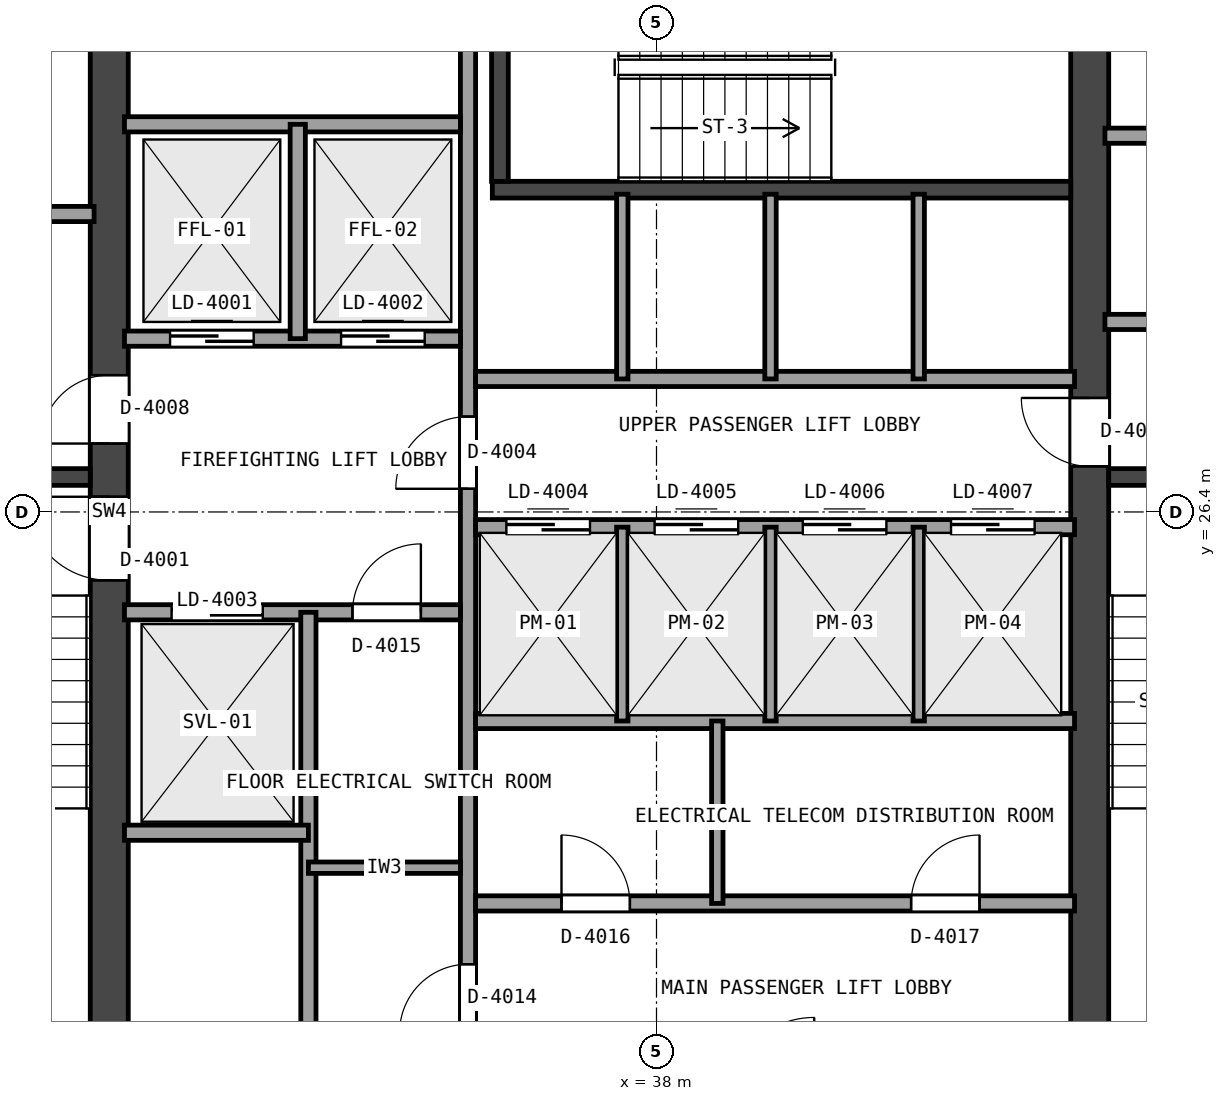
"""IFC4 building model, lengths in metres.
Left out: names, types, materials, properties, quantities, classifications, styles, units other than length and angle.
Written with IfcOpenShell. Run it as: python <this file> out.ifc"""

import sys

from ifc_helpers import new_model, si_unit, direction, frame, frame_2d, origin, place, context, subcontext, project, spatial, rectangle, extrude, element, fill, save


model = new_model("IFC4")
c1 = context("Model", 3, precision=1e-05, world=origin(), true_north=direction((0.0, 1.0)))
c2 = subcontext(c1, "Body", "Model", "MODEL_VIEW")
j1 = project(units=[si_unit("LENGTHUNIT", "METRE"), si_unit("PLANEANGLEUNIT", "RADIAN")], contexts=[c1])
p1 = place(None, origin())
s1 = spatial("IfcSite", under=j1, at=p1, CompositionType="ELEMENT")
p2 = place(p1, origin())
s2 = spatial("IfcBuilding", under=s1, at=p2, CompositionType="ELEMENT")
p3 = place(p2, frame((0.0, 0.0, 172.5)))
s3 = spatial("IfcBuildingStorey", under=s2, at=p3, CompositionType="ELEMENT", Elevation=172.5)
p4 = place(p3, frame((30.8, 18.9, 0.0), z_axis=(0.0, 0.0, 1.0), x_axis=(0.0, 1.0, 0.0)))
e1 = element("IfcWall", 1, at=p4, inside=s3, PredefinedType="SHEAR", context=c2, shape_type="SweptSolid", body=[
    extrude(rectangle(XDim=15.0, YDim=0.5, at=frame_2d((7.5, 0.0))), origin(), (0.0, 0.0, 1.0), 4.08),
])
p5 = place(p4, frame((6.6, 0.0, 0.0)))
e2 = element("IfcOpeningElement", 2, at=p5, cuts=e1, PredefinedType="OPENING", context=c2, shape_type="SweptSolid", body=[
    extrude(rectangle(XDim=1.1, YDim=2.15, at=frame_2d((0.55, 1.075))), frame((0.0, 0.26, 0.0), z_axis=(0.0, -1.0, 0.0), x_axis=(1.0, 0.0, 0.0)), (0.0, 0.0, 1.0), 0.52),
])
p6 = place(p4, frame((8.4, 0.0, 0.0)))
e3 = element("IfcOpeningElement", 3, at=p6, cuts=e1, PredefinedType="OPENING", context=c2, shape_type="SweptSolid", body=[
    extrude(rectangle(XDim=0.9, YDim=2.1, at=frame_2d((0.45, 1.05))), frame((0.0, 0.26, 0.0), z_axis=(0.0, -1.0, 0.0), x_axis=(1.0, 0.0, 0.0)), (0.0, 0.0, 1.0), 0.52),
])
p7 = place(p3, frame((43.7, 18.9, 0.0), z_axis=(0.0, 0.0, 1.0), x_axis=(0.0, 1.0, 0.0)))
e4 = element("IfcWall", 4, at=p7, inside=s3, PredefinedType="SHEAR", context=c2, shape_type="SweptSolid", body=[
    extrude(rectangle(XDim=15.0, YDim=0.5, at=frame_2d((7.5, 0.0))), origin(), (0.0, 0.0, 1.0), 4.08),
])
p8 = place(p7, frame((8.1, 0.0, 0.0)))
e5 = element("IfcOpeningElement", 5, at=p8, cuts=e4, PredefinedType="OPENING", context=c2, shape_type="SweptSolid", body=[
    extrude(rectangle(XDim=0.9, YDim=2.1, at=frame_2d((0.45, 1.05))), frame((0.0, 0.26, 0.0), z_axis=(0.0, -1.0, 0.0), x_axis=(1.0, 0.0, 0.0)), (0.0, 0.0, 1.0), 0.52),
])
p9 = place(p3, frame((27.1, 26.86, 0.0), z_axis=(0.0, 0.0, 1.0), x_axis=(1.0, 0.0, 0.0)))
e6 = element("IfcWall", 6, at=p9, inside=s3, PredefinedType="SHEAR", context=c2, shape_type="SweptSolid", body=[
    extrude(rectangle(XDim=3.45, YDim=0.22, at=frame_2d((1.725, 0.0))), origin(), (0.0, 0.0, 1.0), 4.08),
])
p10 = place(p3, frame((43.95, 26.86, 0.0), z_axis=(0.0, 0.0, 1.0), x_axis=(1.0, 0.0, 0.0)))
e7 = element("IfcWall", 7, at=p10, inside=s3, PredefinedType="SHEAR", context=c2, shape_type="SweptSolid", body=[
    extrude(rectangle(XDim=3.35, YDim=0.22, at=frame_2d((1.675, 0.0))), origin(), (0.0, 0.0, 1.0), 4.08),
])
p11 = place(p3, frame((35.84, 30.64, 0.0), z_axis=(0.0, 0.0, 1.0), x_axis=(1.0, 0.0, 0.0)))
e8 = element("IfcWall", 8, at=p11, inside=s3, PredefinedType="SHEAR", context=c2, shape_type="SweptSolid", body=[
    extrude(rectangle(XDim=7.61, YDim=0.22, at=frame_2d((3.805, 0.0))), origin(), (0.0, 0.0, 1.0), 4.08),
])
p12 = place(p3, frame((35.94, 30.75, 0.0), z_axis=(0.0, 0.0, 1.0), x_axis=(0.0, 1.0, 0.0)))
e9 = element("IfcWall", 9, at=p12, inside=s3, PredefinedType="SHEAR", context=c2, shape_type="SweptSolid", body=[
    extrude(rectangle(XDim=3.15, YDim=0.22, at=frame_2d((1.575, 0.0))), origin(), (0.0, 0.0, 1.0), 4.08),
])
p13 = place(p3, frame((27.15, 30.32, 0.0), z_axis=(0.0, 0.0, 1.0), x_axis=(1.0, 0.0, 0.0)))
e10 = element("IfcWall", 10, at=p13, inside=s3, PredefinedType="SOLIDWALL", context=c2, shape_type="SweptSolid", body=[
    extrude(rectangle(XDim=3.45, YDim=0.2, at=frame_2d((1.725, 0.0))), origin(), (0.0, 0.0, 1.0), 4.08),
])
p14 = place(p3, frame((43.9, 28.9, 0.0), z_axis=(0.0, 0.0, 1.0), x_axis=(1.0, 0.0, 0.0)))
e11 = element("IfcWall", 11, at=p14, inside=s3, PredefinedType="SOLIDWALL", context=c2, shape_type="SweptSolid", body=[
    extrude(rectangle(XDim=3.35, YDim=0.2, at=frame_2d((1.675, 0.0))), origin(), (0.0, 0.0, 1.0), 4.08),
])
p15 = place(p14, frame((1.15, 0.0, 0.0)))
e12 = element("IfcOpeningElement", 12, at=p15, cuts=e11, PredefinedType="OPENING", context=c2, shape_type="SweptSolid", body=[
    extrude(rectangle(XDim=0.9, YDim=2.1, at=frame_2d((0.45, 1.05))), frame((0.0, 0.11, 0.0), z_axis=(0.0, -1.0, 0.0), x_axis=(1.0, 0.0, 0.0)), (0.0, 0.0, 1.0), 0.22),
])
p16 = place(p3, frame((43.9, 31.35, 0.0), z_axis=(0.0, 0.0, 1.0), x_axis=(1.0, 0.0, 0.0)))
e13 = element("IfcWall", 13, at=p16, inside=s3, PredefinedType="SOLIDWALL", context=c2, shape_type="SweptSolid", body=[
    extrude(rectangle(XDim=3.35, YDim=0.2, at=frame_2d((1.675, 0.0))), origin(), (0.0, 0.0, 1.0), 4.08),
])
p17 = place(p3, frame((35.52, 18.95, 0.0), z_axis=(0.0, 0.0, 1.0), x_axis=(0.0, 1.0, 0.0)))
e14 = element("IfcWall", 14, at=p17, inside=s3, PredefinedType="SOLIDWALL", context=c2, shape_type="SweptSolid", body=[
    extrude(rectangle(XDim=14.9, YDim=0.2, at=frame_2d((7.45, 0.0))), origin(), (0.0, 0.0, 1.0), 3.601),
])
p18 = place(p17, frame((7.755, 0.0, 0.0)))
e15 = element("IfcOpeningElement", 15, at=p18, cuts=e14, PredefinedType="OPENING", context=c2, shape_type="SweptSolid", body=[
    extrude(rectangle(XDim=0.95, YDim=2.15, at=frame_2d((0.475, 1.075))), frame((0.0, 0.11, 0.0), z_axis=(0.0, -1.0, 0.0), x_axis=(1.0, 0.0, 0.0)), (0.0, 0.0, 1.0), 0.22),
])
p19 = place(p17, frame((0.6, 0.0, 0.0)))
e16 = element("IfcOpeningElement", 16, at=p19, cuts=e14, PredefinedType="OPENING", context=c2, shape_type="SweptSolid", body=[
    extrude(rectangle(XDim=0.9, YDim=2.1, at=frame_2d((0.45, 1.05))), frame((0.0, 0.11, 0.0), z_axis=(0.0, -1.0, 0.0), x_axis=(1.0, 0.0, 0.0)), (0.0, 0.0, 1.0), 0.22),
])
p20 = place(p3, frame((31.0, 28.68, 0.0), z_axis=(0.0, 0.0, 1.0), x_axis=(1.0, 0.0, 0.0)))
e17 = element("IfcWall", 17, at=p20, inside=s3, PredefinedType="SOLIDWALL", context=c2, shape_type="SweptSolid", body=[
    extrude(rectangle(XDim=4.42, YDim=0.2, at=frame_2d((2.21, 0.0))), origin(), (0.0, 0.0, 1.0), 4.08),
])
p21 = place(p20, frame((0.6, 0.0, 0.0)))
e18 = element("IfcOpeningElement", 18, at=p21, cuts=e17, PredefinedType="OPENING", context=c2, shape_type="SweptSolid", body=[
    extrude(rectangle(XDim=1.1, YDim=2.15, at=frame_2d((0.55, 1.075))), frame((0.0, 0.11, 0.0), z_axis=(0.0, -1.0, 0.0), x_axis=(1.0, 0.0, 0.0)), (0.0, 0.0, 1.0), 0.22),
])
p22 = place(p20, frame((2.85, 0.0, 0.0)))
e19 = element("IfcOpeningElement", 19, at=p22, cuts=e17, PredefinedType="OPENING", context=c2, shape_type="SweptSolid", body=[
    extrude(rectangle(XDim=1.1, YDim=2.15, at=frame_2d((0.55, 1.075))), frame((0.0, 0.11, 0.0), z_axis=(0.0, -1.0, 0.0), x_axis=(1.0, 0.0, 0.0)), (0.0, 0.0, 1.0), 0.22),
])
p23 = place(p3, frame((31.0, 31.5, 0.0), z_axis=(0.0, 0.0, 1.0), x_axis=(1.0, 0.0, 0.0)))
e20 = element("IfcWall", 20, at=p23, inside=s3, PredefinedType="SOLIDWALL", context=c2, shape_type="SweptSolid", body=[
    extrude(rectangle(XDim=4.42, YDim=0.2, at=frame_2d((2.21, 0.0))), origin(), (0.0, 0.0, 1.0), 4.08),
])
p24 = place(p3, frame((33.28, 28.68, 0.0), z_axis=(0.0, 0.0, 1.0), x_axis=(0.0, 1.0, 0.0)))
e21 = element("IfcWall", 21, at=p24, inside=s3, PredefinedType="SOLIDWALL", context=c2, shape_type="SweptSolid", body=[
    extrude(rectangle(XDim=2.82, YDim=0.2, at=frame_2d((1.41, 0.0))), origin(), (0.0, 0.0, 1.0), 4.08),
])
p25 = place(p3, frame((31.0, 25.08, 0.0), z_axis=(0.0, 0.0, 1.0), x_axis=(1.0, 0.0, 0.0)))
e22 = element("IfcWall", 22, at=p25, inside=s3, PredefinedType="SOLIDWALL", context=c2, shape_type="SweptSolid", body=[
    extrude(rectangle(XDim=4.42, YDim=0.2, at=frame_2d((2.21, 0.0))), origin(), (0.0, 0.0, 1.0), 4.08),
])
p26 = place(p25, frame((3.0, 0.0, 0.0)))
e23 = element("IfcOpeningElement", 23, at=p26, cuts=e22, PredefinedType="OPENING", context=c2, shape_type="SweptSolid", body=[
    extrude(rectangle(XDim=0.9, YDim=2.1, at=frame_2d((0.45, 1.05))), frame((0.0, 0.11, 0.0), z_axis=(0.0, -1.0, 0.0), x_axis=(1.0, 0.0, 0.0)), (0.0, 0.0, 1.0), 0.22),
])
p27 = place(p25, frame((0.62, 0.0, 0.0)))
e24 = element("IfcOpeningElement", 24, at=p27, cuts=e22, PredefinedType="OPENING", context=c2, shape_type="SweptSolid", body=[
    extrude(rectangle(XDim=1.2, YDim=2.15, at=frame_2d((0.6, 1.075))), frame((0.0, 0.11, 0.0), z_axis=(0.0, -1.0, 0.0), x_axis=(1.0, 0.0, 0.0)), (0.0, 0.0, 1.0), 0.22),
])
p28 = place(p3, frame((33.42, 18.95, 0.0), z_axis=(0.0, 0.0, 1.0), x_axis=(0.0, 1.0, 0.0)))
e25 = element("IfcWall", 25, at=p28, inside=s3, PredefinedType="SOLIDWALL", context=c2, shape_type="SweptSolid", body=[
    extrude(rectangle(XDim=6.13, YDim=0.2, at=frame_2d((3.065, 0.0))), origin(), (0.0, 0.0, 1.0), 3.601),
])
p29 = place(p3, frame((31.0, 22.18, 0.0), z_axis=(0.0, 0.0, 1.0), x_axis=(1.0, 0.0, 0.0)))
e26 = element("IfcWall", 26, at=p29, inside=s3, PredefinedType="SOLIDWALL", context=c2, shape_type="SweptSolid", body=[
    extrude(rectangle(XDim=2.42, YDim=0.2, at=frame_2d((1.21, 0.0))), origin(), (0.0, 0.0, 1.0), 4.08),
])
p30 = place(p3, frame((33.42, 20.62, 0.0), z_axis=(0.0, 0.0, 1.0), x_axis=(1.0, 0.0, 0.0)))
e27 = element("IfcWall", 27, at=p30, inside=s3, PredefinedType="PARTITIONING", context=c2, shape_type="SweptSolid", body=[
    extrude(rectangle(XDim=2.0, YDim=0.15, at=frame_2d((1.0, 0.0))), origin(), (0.0, 0.0, 1.0), 4.08),
])
p31 = place(p3, frame((35.62, 28.15, 0.0), z_axis=(0.0, 0.0, 1.0), x_axis=(1.0, 0.0, 0.0)))
e28 = element("IfcWall", 28, at=p31, inside=s3, PredefinedType="SOLIDWALL", context=c2, shape_type="SweptSolid", body=[
    extrude(rectangle(XDim=7.88, YDim=0.2, at=frame_2d((3.94, 0.0))), origin(), (0.0, 0.0, 1.0), 4.08),
])
p32 = place(p3, frame((35.62, 26.2, 0.0), z_axis=(0.0, 0.0, 1.0), x_axis=(1.0, 0.0, 0.0)))
e29 = element("IfcWall", 29, at=p32, inside=s3, PredefinedType="SOLIDWALL", context=c2, shape_type="SweptSolid", body=[
    extrude(rectangle(XDim=7.88, YDim=0.2, at=frame_2d((3.94, 0.0))), origin(), (0.0, 0.0, 1.0), 4.08),
])
p33 = place(p32, frame((0.405, 0.0, 0.0)))
e30 = element("IfcOpeningElement", 30, at=p33, cuts=e29, PredefinedType="OPENING", context=c2, shape_type="SweptSolid", body=[
    extrude(rectangle(XDim=1.1, YDim=2.15, at=frame_2d((0.55, 1.075))), frame((0.0, 0.11, 0.0), z_axis=(0.0, -1.0, 0.0), x_axis=(1.0, 0.0, 0.0)), (0.0, 0.0, 1.0), 0.22),
])
p34 = place(p32, frame((2.355, 0.0, 0.0)))
e31 = element("IfcOpeningElement", 31, at=p34, cuts=e29, PredefinedType="OPENING", context=c2, shape_type="SweptSolid", body=[
    extrude(rectangle(XDim=1.1, YDim=2.15, at=frame_2d((0.55, 1.075))), frame((0.0, 0.11, 0.0), z_axis=(0.0, -1.0, 0.0), x_axis=(1.0, 0.0, 0.0)), (0.0, 0.0, 1.0), 0.22),
])
p35 = place(p32, frame((4.305, 0.0, 0.0)))
e32 = element("IfcOpeningElement", 32, at=p35, cuts=e29, PredefinedType="OPENING", context=c2, shape_type="SweptSolid", body=[
    extrude(rectangle(XDim=1.1, YDim=2.15, at=frame_2d((0.55, 1.075))), frame((0.0, 0.11, 0.0), z_axis=(0.0, -1.0, 0.0), x_axis=(1.0, 0.0, 0.0)), (0.0, 0.0, 1.0), 0.22),
])
p36 = place(p32, frame((6.255, 0.0, 0.0)))
e33 = element("IfcOpeningElement", 33, at=p36, cuts=e29, PredefinedType="OPENING", context=c2, shape_type="SweptSolid", body=[
    extrude(rectangle(XDim=1.1, YDim=2.15, at=frame_2d((0.55, 1.075))), frame((0.0, 0.11, 0.0), z_axis=(0.0, -1.0, 0.0), x_axis=(1.0, 0.0, 0.0)), (0.0, 0.0, 1.0), 0.22),
])
p37 = place(p3, frame((35.62, 23.65, 0.0), z_axis=(0.0, 0.0, 1.0), x_axis=(1.0, 0.0, 0.0)))
e34 = element("IfcWall", 34, at=p37, inside=s3, PredefinedType="SOLIDWALL", context=c2, shape_type="SweptSolid", body=[
    extrude(rectangle(XDim=7.88, YDim=0.2, at=frame_2d((3.94, 0.0))), origin(), (0.0, 0.0, 1.0), 3.601),
])
p38 = place(p3, frame((35.62, 21.25, 0.0), z_axis=(0.0, 0.0, 1.0), x_axis=(1.0, 0.0, 0.0)))
e35 = element("IfcWall", 35, at=p38, inside=s3, PredefinedType="SOLIDWALL", context=c2, shape_type="SweptSolid", body=[
    extrude(rectangle(XDim=7.88, YDim=0.2, at=frame_2d((3.94, 0.0))), origin(), (0.0, 0.0, 1.0), 4.08),
])
p39 = place(p38, frame((1.13, 0.0, 0.0)))
e36 = element("IfcOpeningElement", 36, at=p39, cuts=e35, PredefinedType="OPENING", context=c2, shape_type="SweptSolid", body=[
    extrude(rectangle(XDim=0.9, YDim=2.1, at=frame_2d((0.45, 1.05))), frame((0.0, 0.11, 0.0), z_axis=(0.0, -1.0, 0.0), x_axis=(1.0, 0.0, 0.0)), (0.0, 0.0, 1.0), 0.22),
])
p40 = place(p38, frame((5.73, 0.0, 0.0)))
e37 = element("IfcOpeningElement", 37, at=p40, cuts=e35, PredefinedType="OPENING", context=c2, shape_type="SweptSolid", body=[
    extrude(rectangle(XDim=0.9, YDim=2.1, at=frame_2d((0.45, 1.05))), frame((0.0, 0.11, 0.0), z_axis=(0.0, -1.0, 0.0), x_axis=(1.0, 0.0, 0.0)), (0.0, 0.0, 1.0), 0.22),
])
for number, where, z_axis, x_axis in (
    (38, (37.55, 28.15, 0.0), (0.0, 0.0, 1.0), (0.0, 1.0, 0.0)),
    (39, (39.5, 28.15, 0.0), (0.0, 0.0, 1.0), (0.0, 1.0, 0.0)),
    (40, (41.45, 28.15, 0.0), (0.0, 0.0, 1.0), (0.0, 1.0, 0.0)),
):
    element("IfcWall", number, at=place(p3, frame(where, z_axis=z_axis, x_axis=x_axis)), inside=s3, PredefinedType="PARTITIONING", context=c2, shape_type="SweptSolid", body=[
        extrude(rectangle(XDim=2.43, YDim=0.15, at=frame_2d((1.215, 0.0))), origin(), (0.0, 0.0, 1.0), 4.08),
    ])
for number, where, z_axis, x_axis in (
    (41, (37.55, 23.65, 0.0), (0.0, 0.0, 1.0), (0.0, 1.0, 0.0)),
    (42, (39.5, 23.65, 0.0), (0.0, 0.0, 1.0), (0.0, 1.0, 0.0)),
    (43, (41.45, 23.65, 0.0), (0.0, 0.0, 1.0), (0.0, 1.0, 0.0)),
):
    element("IfcWall", number, at=place(p3, frame(where, z_axis=z_axis, x_axis=x_axis)), inside=s3, PredefinedType="PARTITIONING", context=c2, shape_type="SweptSolid", body=[
        extrude(rectangle(XDim=2.55, YDim=0.15, at=frame_2d((1.275, 0.0))), origin(), (0.0, 0.0, 1.0), 3.601),
    ])
p41 = place(p3, frame((38.8, 21.25, 0.0), z_axis=(0.0, 0.0, 1.0), x_axis=(0.0, 1.0, 0.0)))
e44 = element("IfcWall", 44, at=p41, inside=s3, PredefinedType="PARTITIONING", context=c2, shape_type="SweptSolid", body=[
    extrude(rectangle(XDim=2.4, YDim=0.15, at=frame_2d((1.2, 0.0))), origin(), (0.0, 0.0, 1.0), 3.601),
])
p42 = place(p5, origin())
e45 = element("IfcDoor", 45, at=p42, inside=s3, OperationType="SINGLE_SWING_LEFT", PredefinedType="DOOR", context=c2, shape_type="SweptSolid", body=[
    extrude(rectangle(XDim=1.1, YDim=2.15, at=frame_2d((0.55, 1.075))), frame((0.0, 0.025, 0.0), z_axis=(0.0, -1.0, 0.0), x_axis=(1.0, 0.0, 0.0)), (0.0, 0.0, 1.0), 0.05),
])
fill(e2, e45)
p43 = place(p18, origin())
e46 = element("IfcDoor", 46, at=p43, inside=s3, OperationType="SINGLE_SWING_RIGHT", PredefinedType="DOOR", context=c2, shape_type="SweptSolid", body=[
    extrude(rectangle(XDim=0.95, YDim=2.15, at=frame_2d((0.475, 1.075))), frame((0.0, 0.025, 0.0), z_axis=(0.0, -1.0, 0.0), x_axis=(1.0, 0.0, 0.0)), (0.0, 0.0, 1.0), 0.05),
])
fill(e15, e46)
p44 = place(p8, origin())
e47 = element("IfcDoor", 47, at=p44, inside=s3, OperationType="SINGLE_SWING_LEFT", PredefinedType="DOOR", context=c2, shape_type="SweptSolid", body=[
    extrude(rectangle(XDim=0.9, YDim=2.1, at=frame_2d((0.45, 1.05))), frame((0.0, 0.025, 0.0), z_axis=(0.0, -1.0, 0.0), x_axis=(1.0, 0.0, 0.0)), (0.0, 0.0, 1.0), 0.05),
])
fill(e5, e47)
p45 = place(p6, origin())
e48 = element("IfcDoor", 48, at=p45, inside=s3, OperationType="SINGLE_SWING_RIGHT", PredefinedType="DOOR", context=c2, shape_type="SweptSolid", body=[
    extrude(rectangle(XDim=0.9, YDim=2.1, at=frame_2d((0.45, 1.05))), frame((0.0, 0.025, 0.0), z_axis=(0.0, -1.0, 0.0), x_axis=(1.0, 0.0, 0.0)), (0.0, 0.0, 1.0), 0.05),
])
fill(e3, e48)
p46 = place(p19, origin())
e49 = element("IfcDoor", 49, at=p46, inside=s3, OperationType="SINGLE_SWING_RIGHT", PredefinedType="DOOR", context=c2, shape_type="SweptSolid", body=[
    extrude(rectangle(XDim=0.9, YDim=2.1, at=frame_2d((0.45, 1.05))), frame((0.0, 0.025, 0.0), z_axis=(0.0, -1.0, 0.0), x_axis=(1.0, 0.0, 0.0)), (0.0, 0.0, 1.0), 0.05),
])
fill(e16, e49)
p47 = place(p26, origin())
e50 = element("IfcDoor", 50, at=p47, inside=s3, OperationType="SINGLE_SWING_LEFT", PredefinedType="DOOR", context=c2, shape_type="SweptSolid", body=[
    extrude(rectangle(XDim=0.9, YDim=2.1, at=frame_2d((0.45, 1.05))), frame((0.0, 0.025, 0.0), z_axis=(0.0, -1.0, 0.0), x_axis=(1.0, 0.0, 0.0)), (0.0, 0.0, 1.0), 0.05),
])
fill(e23, e50)
p48 = place(p39, origin())
e51 = element("IfcDoor", 51, at=p48, inside=s3, OperationType="SINGLE_SWING_RIGHT", PredefinedType="DOOR", context=c2, shape_type="SweptSolid", body=[
    extrude(rectangle(XDim=0.9, YDim=2.1, at=frame_2d((0.45, 1.05))), frame((0.0, 0.025, 0.0), z_axis=(0.0, -1.0, 0.0), x_axis=(1.0, 0.0, 0.0)), (0.0, 0.0, 1.0), 0.05),
])
fill(e36, e51)
p49 = place(p40, origin())
e52 = element("IfcDoor", 52, at=p49, inside=s3, OperationType="SINGLE_SWING_LEFT", PredefinedType="DOOR", context=c2, shape_type="SweptSolid", body=[
    extrude(rectangle(XDim=0.9, YDim=2.1, at=frame_2d((0.45, 1.05))), frame((0.0, 0.025, 0.0), z_axis=(0.0, -1.0, 0.0), x_axis=(1.0, 0.0, 0.0)), (0.0, 0.0, 1.0), 0.05),
])
fill(e37, e52)
p50 = place(p21, origin())
e53 = element("IfcDoor", 53, at=p50, inside=s3, OperationType="SLIDING_TO_LEFT", PredefinedType="DOOR", context=c2, shape_type="SweptSolid", body=[
    extrude(rectangle(XDim=1.1, YDim=2.15, at=frame_2d((0.55, 1.075))), frame((0.0, 0.025, 0.0), z_axis=(0.0, -1.0, 0.0), x_axis=(1.0, 0.0, 0.0)), (0.0, 0.0, 1.0), 0.05),
])
fill(e18, e53)
p51 = place(p22, origin())
e54 = element("IfcDoor", 54, at=p51, inside=s3, OperationType="SLIDING_TO_LEFT", PredefinedType="DOOR", context=c2, shape_type="SweptSolid", body=[
    extrude(rectangle(XDim=1.1, YDim=2.15, at=frame_2d((0.55, 1.075))), frame((0.0, 0.025, 0.0), z_axis=(0.0, -1.0, 0.0), x_axis=(1.0, 0.0, 0.0)), (0.0, 0.0, 1.0), 0.05),
])
fill(e19, e54)
p52 = place(p27, origin())
e55 = element("IfcDoor", 55, at=p52, inside=s3, OperationType="SLIDING_TO_LEFT", PredefinedType="DOOR", context=c2, shape_type="SweptSolid", body=[
    extrude(rectangle(XDim=1.2, YDim=2.15, at=frame_2d((0.6, 1.075))), frame((0.0, 0.025, 0.0), z_axis=(0.0, -1.0, 0.0), x_axis=(1.0, 0.0, 0.0)), (0.0, 0.0, 1.0), 0.05),
])
fill(e24, e55)
p53 = place(p33, origin())
e56 = element("IfcDoor", 56, at=p53, inside=s3, OperationType="SLIDING_TO_LEFT", PredefinedType="DOOR", context=c2, shape_type="SweptSolid", body=[
    extrude(rectangle(XDim=1.1, YDim=2.15, at=frame_2d((0.55, 1.075))), frame((0.0, 0.025, 0.0), z_axis=(0.0, -1.0, 0.0), x_axis=(1.0, 0.0, 0.0)), (0.0, 0.0, 1.0), 0.05),
])
fill(e30, e56)
p54 = place(p34, origin())
e57 = element("IfcDoor", 57, at=p54, inside=s3, OperationType="SLIDING_TO_LEFT", PredefinedType="DOOR", context=c2, shape_type="SweptSolid", body=[
    extrude(rectangle(XDim=1.1, YDim=2.15, at=frame_2d((0.55, 1.075))), frame((0.0, 0.025, 0.0), z_axis=(0.0, -1.0, 0.0), x_axis=(1.0, 0.0, 0.0)), (0.0, 0.0, 1.0), 0.05),
])
fill(e31, e57)
p55 = place(p35, origin())
e58 = element("IfcDoor", 58, at=p55, inside=s3, OperationType="SLIDING_TO_LEFT", PredefinedType="DOOR", context=c2, shape_type="SweptSolid", body=[
    extrude(rectangle(XDim=1.1, YDim=2.15, at=frame_2d((0.55, 1.075))), frame((0.0, 0.025, 0.0), z_axis=(0.0, -1.0, 0.0), x_axis=(1.0, 0.0, 0.0)), (0.0, 0.0, 1.0), 0.05),
])
fill(e32, e58)
p56 = place(p36, origin())
e59 = element("IfcDoor", 59, at=p56, inside=s3, OperationType="SLIDING_TO_LEFT", PredefinedType="DOOR", context=c2, shape_type="SweptSolid", body=[
    extrude(rectangle(XDim=1.1, YDim=2.15, at=frame_2d((0.55, 1.075))), frame((0.0, 0.025, 0.0), z_axis=(0.0, -1.0, 0.0), x_axis=(1.0, 0.0, 0.0)), (0.0, 0.0, 1.0), 0.05),
])
fill(e33, e59)
save(model, sys.argv[1])
